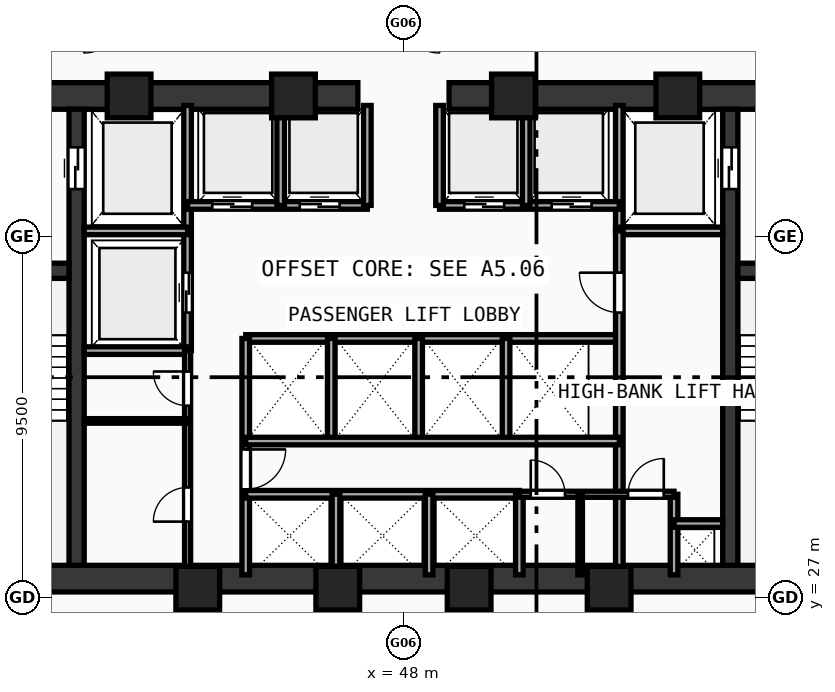
"""IFC4 building model, lengths in metres.
Left out: names, types, materials, properties, quantities, classifications, styles, units other than length and angle.
Written with IfcOpenShell. Run it as: python <this file> out.ifc"""

import sys

from ifc_helpers import new_model, si_unit, direction, frame, frame_2d, origin, origin_with_axes, origin_2d, place, context, subcontext, project, spatial, rectangle, hollow_rectangle, extrude, source, transform, mapped, element, fill, save


model = new_model("IFC4")
c1 = context("Model", 3, precision=1e-05, world=origin(), true_north=direction((0.0, 1.0)))
c2 = subcontext(c1, "Body", "Model", "MODEL_VIEW")
j1 = project(units=[si_unit("LENGTHUNIT", "METRE"), si_unit("PLANEANGLEUNIT", "RADIAN")], contexts=[c1])
p1 = place(None, origin())
s1 = spatial("IfcSite", under=j1, at=p1, CompositionType="ELEMENT")
p2 = place(p1, origin())
s2 = spatial("IfcBuilding", under=s1, at=p2, CompositionType="ELEMENT")
p3 = place(p2, frame((0.0, 0.0, 70.33)))
s3 = spatial("IfcBuildingStorey", under=s2, at=p3, CompositionType="ELEMENT", Elevation=70.33)
p4 = place(p3, frame((35.45, 27.5, 0.0), z_axis=(0.0, 0.0, 1.0), x_axis=(1.0, 0.0, 0.0)))
e1 = element("IfcWall", 1, at=p4, inside=s3, PredefinedType="SHEAR", context=c2, shape_type="SweptSolid", body=[
    extrude(rectangle(XDim=25.1, YDim=0.7, at=frame_2d((12.55, 0.0))), origin(), (0.0, 0.0, 1.0), 5.77),
])
p5 = place(p3, frame((35.45, 40.2, 0.0), z_axis=(0.0, 0.0, 1.0), x_axis=(1.0, 0.0, 0.0)))
e2 = element("IfcWall", 2, at=p5, inside=s3, PredefinedType="SHEAR", context=c2, shape_type="SweptSolid", body=[
    extrude(rectangle(XDim=11.35, YDim=0.7, at=frame_2d((5.675, 0.0))), origin(), (0.0, 0.0, 1.0), 5.77),
])
p6 = place(p5, frame((1.7, 0.0, 0.0)))
e3 = element("IfcOpeningElement", 3, at=p6, cuts=e2, PredefinedType="OPENING", context=c2, shape_type="SweptSolid", body=[
    extrude(rectangle(XDim=1.05, YDim=2.1, at=frame_2d((0.525, 1.05))), frame((0.0, 0.36, 0.0), z_axis=(0.0, -1.0, 0.0), x_axis=(1.0, 0.0, 0.0)), (0.0, 0.0, 1.0), 0.72),
])
p7 = place(p3, frame((49.2, 40.2, 0.0), z_axis=(0.0, 0.0, 1.0), x_axis=(1.0, 0.0, 0.0)))
e4 = element("IfcWall", 4, at=p7, inside=s3, PredefinedType="SHEAR", context=c2, shape_type="SweptSolid", body=[
    extrude(rectangle(XDim=11.35, YDim=0.7, at=frame_2d((5.675, 0.0))), origin(), (0.0, 0.0, 1.0), 5.77),
])
p8 = place(p7, frame((8.6, 0.0, 0.0)))
e5 = element("IfcOpeningElement", 5, at=p8, cuts=e4, PredefinedType="OPENING", context=c2, shape_type="SweptSolid", body=[
    extrude(rectangle(XDim=1.05, YDim=2.1, at=frame_2d((0.525, 1.05))), frame((0.0, 0.36, 0.0), z_axis=(0.0, -1.0, 0.0), x_axis=(1.0, 0.0, 0.0)), (0.0, 0.0, 1.0), 0.72),
])
p9 = place(p3, frame((39.4, 27.85, 0.0), z_axis=(0.0, 0.0, 1.0), x_axis=(0.0, 1.0, 0.0)))
e6 = element("IfcWall", 6, at=p9, inside=s3, PredefinedType="SHEAR", context=c2, shape_type="SweptSolid", body=[
    extrude(rectangle(XDim=12.0, YDim=0.4, at=frame_2d((6.0, 0.0))), origin(), (0.0, 0.0, 1.0), 5.77),
])
p10 = place(p9, frame((9.9, 0.0, 0.0)))
e7 = element("IfcOpeningElement", 7, at=p10, cuts=e6, PredefinedType="OPENING", context=c2, shape_type="SweptSolid", body=[
    extrude(rectangle(XDim=1.1, YDim=2.1, at=frame_2d((0.55, 1.05))), frame((0.0, 0.21, 0.0), z_axis=(0.0, -1.0, 0.0), x_axis=(1.0, 0.0, 0.0)), (0.0, 0.0, 1.0), 0.42),
])
p11 = place(p3, frame((56.6, 27.85, 0.0), z_axis=(0.0, 0.0, 1.0), x_axis=(0.0, 1.0, 0.0)))
e8 = element("IfcWall", 8, at=p11, inside=s3, PredefinedType="SHEAR", context=c2, shape_type="SweptSolid", body=[
    extrude(rectangle(XDim=12.0, YDim=0.4, at=frame_2d((6.0, 0.0))), origin(), (0.0, 0.0, 1.0), 5.77),
])
p12 = place(p11, frame((9.9, 0.0, 0.0)))
e9 = element("IfcOpeningElement", 9, at=p12, cuts=e8, PredefinedType="OPENING", context=c2, shape_type="SweptSolid", body=[
    extrude(rectangle(XDim=1.1, YDim=2.1, at=frame_2d((0.55, 1.05))), frame((0.0, 0.21, 0.0), z_axis=(0.0, -1.0, 0.0), x_axis=(1.0, 0.0, 0.0)), (0.0, 0.0, 1.0), 0.42),
])
p13 = place(p3, frame((36.15, 35.6, 0.0), z_axis=(0.0, 0.0, 1.0), x_axis=(1.0, 0.0, 0.0)))
e10 = element("IfcWall", 10, at=p13, inside=s3, PredefinedType="SHEAR", context=c2, shape_type="SweptSolid", body=[
    extrude(rectangle(XDim=3.05, YDim=0.4, at=frame_2d((1.525, 0.0))), origin(), (0.0, 0.0, 1.0), 5.77),
])
p14 = place(p13, frame((0.97, 0.0, 0.0)))
e11 = element("IfcOpeningElement", 11, at=p14, cuts=e10, PredefinedType="OPENING", context=c2, shape_type="SweptSolid", body=[
    extrude(rectangle(XDim=1.05, YDim=2.1, at=frame_2d((0.525, 1.05))), frame((0.0, 0.21, 0.0), z_axis=(0.0, -1.0, 0.0), x_axis=(1.0, 0.0, 0.0)), (0.0, 0.0, 1.0), 0.42),
])
p15 = place(p3, frame((56.8, 35.6, 0.0), z_axis=(0.0, 0.0, 1.0), x_axis=(1.0, 0.0, 0.0)))
e12 = element("IfcWall", 12, at=p15, inside=s3, PredefinedType="SHEAR", context=c2, shape_type="SweptSolid", body=[
    extrude(rectangle(XDim=3.05, YDim=0.4, at=frame_2d((1.525, 0.0))), origin(), (0.0, 0.0, 1.0), 5.77),
])
p16 = place(p15, frame((1.02, 0.0, 0.0)))
e13 = element("IfcOpeningElement", 13, at=p16, cuts=e12, PredefinedType="OPENING", context=c2, shape_type="SweptSolid", body=[
    extrude(rectangle(XDim=1.05, YDim=2.1, at=frame_2d((0.525, 1.05))), frame((0.0, 0.21, 0.0), z_axis=(0.0, -1.0, 0.0), x_axis=(1.0, 0.0, 0.0)), (0.0, 0.0, 1.0), 0.42),
])
m1 = source(origin(), c2, "Body", "SweptSolid", [
    extrude(hollow_rectangle(XDim=1.15, YDim=1.15, WallThickness=0.048, at=origin_2d()), origin(), (0.0, 0.0, 1.0), 6.03),
])
for number, where, z_axis, x_axis in (
    (14, (42.588, 27.25, -0.26), (0.0, 0.0, 1.0), (1.0, 0.0, 0.0)),
    (15, (46.272, 27.25, -0.26), (0.0, 0.0, 1.0), (1.0, 0.0, 0.0)),
    (16, (49.729, 27.25, -0.26), (0.0, 0.0, 1.0), (1.0, 0.0, 0.0)),
    (17, (53.412, 27.25, -0.26), (0.0, 0.0, 1.0), (1.0, 0.0, 0.0)),
    (18, (55.219, 40.2, -0.26), (0.0, 0.0, 1.0), (1.0, 0.0, 0.0)),
    (19, (50.894, 40.2, -0.26), (0.0, 0.0, 1.0), (1.0, 0.0, 0.0)),
    (20, (45.106, 40.2, -0.26), (0.0, 0.0, 1.0), (1.0, 0.0, 0.0)),
    (21, (40.781, 40.2, -0.26), (0.0, 0.0, 1.0), (1.0, 0.0, 0.0)),
):
    element("IfcColumn", number, at=place(p3, frame(where, z_axis=z_axis, x_axis=x_axis)), inside=s3, PredefinedType="COLUMN", context=c2, shape_type="MappedRepresentation", body=[
        mapped(m1, transform((0.0, 0.0, 0.0), scale=1.0)),
    ])
p17 = place(p3, frame((42.32, 33.5, 0.0), z_axis=(0.0, 0.0, 1.0), x_axis=(0.0, 1.0, 0.0)))
e22 = element("IfcWall", 22, at=p17, inside=s3, PredefinedType="SOLIDWALL", context=c2, shape_type="SweptSolid", body=[
    extrude(rectangle(XDim=6.45, YDim=0.2, at=frame_2d((3.225, 0.0))), origin(), (0.0, 0.0, 1.0), 5.77),
])
p18 = place(p17, frame((1.0, 0.0, 0.0)))
e23 = element("IfcOpeningElement", 23, at=p18, cuts=e22, PredefinedType="OPENING", context=c2, shape_type="SweptSolid", body=[
    extrude(rectangle(XDim=1.05, YDim=2.1, at=frame_2d((0.525, 1.05))), frame((0.0, 0.11, 0.0), z_axis=(0.0, -1.0, 0.0), x_axis=(1.0, 0.0, 0.0)), (0.0, 0.0, 1.0), 0.22),
])
for number, where, z_axis, x_axis in (
    (24, (39.6, 36.65, 0.0), (0.0, 0.0, 1.0), (1.0, 0.0, 0.0)),
    (25, (39.6, 33.5, 0.0), (0.0, 0.0, 1.0), (1.0, 0.0, 0.0)),
):
    element("IfcWall", number, at=place(p3, frame(where, z_axis=z_axis, x_axis=x_axis)), inside=s3, PredefinedType="SOLIDWALL", context=c2, shape_type="SweptSolid", body=[
        extrude(rectangle(XDim=2.72, YDim=0.2, at=frame_2d((1.36, 0.0))), origin(), (0.0, 0.0, 1.0), 5.77),
    ])
p19 = place(p3, frame((53.68, 36.65, 0.0), z_axis=(0.0, 0.0, 1.0), x_axis=(0.0, 1.0, 0.0)))
e26 = element("IfcWall", 26, at=p19, inside=s3, PredefinedType="SOLIDWALL", context=c2, shape_type="SweptSolid", body=[
    extrude(rectangle(XDim=3.3, YDim=0.2, at=frame_2d((1.65, 0.0))), origin(), (0.0, 0.0, 1.0), 5.77),
])
p20 = place(p3, frame((53.68, 36.65, 0.0), z_axis=(0.0, 0.0, 1.0), x_axis=(1.0, 0.0, 0.0)))
e27 = element("IfcWall", 27, at=p20, inside=s3, PredefinedType="SOLIDWALL", context=c2, shape_type="SweptSolid", body=[
    extrude(rectangle(XDim=2.72, YDim=0.2, at=frame_2d((1.36, 0.0))), origin(), (0.0, 0.0, 1.0), 5.77),
])
p21 = place(p3, frame((42.32, 37.32, 0.0), z_axis=(0.0, 0.0, 1.0), x_axis=(1.0, 0.0, 0.0)))
e28 = element("IfcWall", 28, at=p21, inside=s3, PredefinedType="SOLIDWALL", context=c2, shape_type="SweptSolid", body=[
    extrude(rectangle(XDim=4.73, YDim=0.2, at=frame_2d((2.365, 0.0))), origin(), (0.0, 0.0, 1.0), 5.77),
])
p22 = place(p21, frame((0.65, 0.0, 0.0)))
e29 = element("IfcOpeningElement", 29, at=p22, cuts=e28, PredefinedType="OPENING", context=c2, shape_type="SweptSolid", body=[
    extrude(rectangle(XDim=1.05, YDim=2.1, at=frame_2d((0.525, 1.05))), frame((0.0, 0.11, 0.0), z_axis=(0.0, -1.0, 0.0), x_axis=(1.0, 0.0, 0.0)), (0.0, 0.0, 1.0), 0.22),
])
p23 = place(p21, frame((2.95, 0.0, 0.0)))
e30 = element("IfcOpeningElement", 30, at=p23, cuts=e28, PredefinedType="OPENING", context=c2, shape_type="SweptSolid", body=[
    extrude(rectangle(XDim=1.05, YDim=2.1, at=frame_2d((0.525, 1.05))), frame((0.0, 0.11, 0.0), z_axis=(0.0, -1.0, 0.0), x_axis=(1.0, 0.0, 0.0)), (0.0, 0.0, 1.0), 0.22),
])
p24 = place(p3, frame((48.95, 37.32, 0.0), z_axis=(0.0, 0.0, 1.0), x_axis=(1.0, 0.0, 0.0)))
e31 = element("IfcWall", 31, at=p24, inside=s3, PredefinedType="SOLIDWALL", context=c2, shape_type="SweptSolid", body=[
    extrude(rectangle(XDim=4.73, YDim=0.2, at=frame_2d((2.365, 0.0))), origin(), (0.0, 0.0, 1.0), 5.77),
])
p25 = place(p24, frame((0.65, 0.0, 0.0)))
e32 = element("IfcOpeningElement", 32, at=p25, cuts=e31, PredefinedType="OPENING", context=c2, shape_type="SweptSolid", body=[
    extrude(rectangle(XDim=1.05, YDim=2.1, at=frame_2d((0.525, 1.05))), frame((0.0, 0.11, 0.0), z_axis=(0.0, -1.0, 0.0), x_axis=(1.0, 0.0, 0.0)), (0.0, 0.0, 1.0), 0.22),
])
p26 = place(p24, frame((2.95, 0.0, 0.0)))
e33 = element("IfcOpeningElement", 33, at=p26, cuts=e31, PredefinedType="OPENING", context=c2, shape_type="SweptSolid", body=[
    extrude(rectangle(XDim=1.05, YDim=2.1, at=frame_2d((0.525, 1.05))), frame((0.0, 0.11, 0.0), z_axis=(0.0, -1.0, 0.0), x_axis=(1.0, 0.0, 0.0)), (0.0, 0.0, 1.0), 0.22),
])
for number, where, z_axis, x_axis in (
    (34, (47.05, 37.32, 0.0), (0.0, 0.0, 1.0), (0.0, 1.0, 0.0)),
    (35, (48.95, 37.32, 0.0), (0.0, 0.0, 1.0), (0.0, 1.0, 0.0)),
):
    element("IfcWall", number, at=place(p3, frame(where, z_axis=z_axis, x_axis=x_axis)), inside=s3, PredefinedType="SOLIDWALL", context=c2, shape_type="SweptSolid", body=[
        extrude(rectangle(XDim=2.63, YDim=0.2, at=frame_2d((1.315, 0.0))), origin(), (0.0, 0.0, 1.0), 5.77),
    ])
for number, where, z_axis, x_axis in (
    (36, (44.77, 37.32, 0.0), (0.0, 0.0, 1.0), (0.0, 1.0, 0.0)),
    (37, (51.23, 37.32, 0.0), (0.0, 0.0, 1.0), (0.0, 1.0, 0.0)),
):
    element("IfcWall", number, at=place(p3, frame(where, z_axis=z_axis, x_axis=x_axis)), inside=s3, PredefinedType="SOLIDWALL", context=c2, shape_type="SweptSolid", body=[
        extrude(rectangle(XDim=2.63, YDim=0.2, at=frame_2d((1.315, 0.0))), origin(), (0.0, 0.0, 1.0), 2.42),
    ])
p27 = place(p3, frame((43.85, 33.82, 0.0), z_axis=(0.0, 0.0, 1.0), x_axis=(1.0, 0.0, 0.0)))
e38 = element("IfcWall", 38, at=p27, inside=s3, PredefinedType="SOLIDWALL", context=c2, shape_type="SweptSolid", body=[
    extrude(rectangle(XDim=9.83, YDim=0.2, at=frame_2d((4.915, 0.0))), origin(), (0.0, 0.0, 1.0), 5.77),
])
p28 = place(p3, frame((43.85, 27.6, 0.0), z_axis=(0.0, 0.0, 1.0), x_axis=(0.0, 1.0, 0.0)))
e39 = element("IfcWall", 39, at=p28, inside=s3, PredefinedType="SOLIDWALL", context=c2, shape_type="SweptSolid", body=[
    extrude(rectangle(XDim=6.22, YDim=0.2, at=frame_2d((3.11, 0.0))), origin(), (0.0, 0.0, 1.0), 5.77),
])
p29 = place(p28, frame((2.25, 0.0, 0.0)))
e40 = element("IfcOpeningElement", 40, at=p29, cuts=e39, PredefinedType="OPENING", context=c2, shape_type="SweptSolid", body=[
    extrude(rectangle(XDim=1.05, YDim=2.1, at=frame_2d((0.525, 1.05))), frame((0.0, 0.11, 0.0), z_axis=(0.0, -1.0, 0.0), x_axis=(1.0, 0.0, 0.0)), (0.0, 0.0, 1.0), 0.22),
])
p30 = place(p3, frame((53.68, 27.6, 0.0), z_axis=(0.0, 0.0, 1.0), x_axis=(0.0, 1.0, 0.0)))
e41 = element("IfcWall", 41, at=p30, inside=s3, PredefinedType="SOLIDWALL", context=c2, shape_type="SweptSolid", body=[
    extrude(rectangle(XDim=9.05, YDim=0.2, at=frame_2d((4.525, 0.0))), origin(), (0.0, 0.0, 1.0), 2.42),
])
p31 = place(p30, frame((6.9, 0.0, 0.0)))
e42 = element("IfcOpeningElement", 42, at=p31, cuts=e41, PredefinedType="OPENING", context=c2, shape_type="SweptSolid", body=[
    extrude(rectangle(XDim=1.05, YDim=2.1, at=frame_2d((0.525, 1.05))), frame((0.0, 0.11, 0.0), z_axis=(0.0, -1.0, 0.0), x_axis=(1.0, 0.0, 0.0)), (0.0, 0.0, 1.0), 0.22),
])
for number, where, z_axis, x_axis in (
    (43, (46.1, 31.12, 0.0), (0.0, 0.0, 1.0), (0.0, 1.0, 0.0)),
    (44, (48.4, 31.12, 0.0), (0.0, 0.0, 1.0), (0.0, 1.0, 0.0)),
    (45, (50.7, 31.12, 0.0), (0.0, 0.0, 1.0), (0.0, 1.0, 0.0)),
):
    element("IfcWall", number, at=place(p3, frame(where, z_axis=z_axis, x_axis=x_axis)), inside=s3, PredefinedType="SOLIDWALL", context=c2, shape_type="SweptSolid", body=[
        extrude(rectangle(XDim=2.7, YDim=0.2, at=frame_2d((1.35, 0.0))), origin(), (0.0, 0.0, 1.0), 5.77),
    ])
p32 = place(p3, frame((43.85, 29.72, 0.0), z_axis=(0.0, 0.0, 1.0), x_axis=(1.0, 0.0, 0.0)))
e46 = element("IfcWall", 46, at=p32, inside=s3, PredefinedType="SOLIDWALL", context=c2, shape_type="SweptSolid", body=[
    extrude(rectangle(XDim=7.2, YDim=0.2, at=frame_2d((3.6, 0.0))), origin(), (0.0, 0.0, 1.0), 5.77),
])
p33 = place(p3, frame((51.05, 27.6, 0.0), z_axis=(0.0, 0.0, 1.0), x_axis=(0.0, 1.0, 0.0)))
e47 = element("IfcWall", 47, at=p33, inside=s3, PredefinedType="SOLIDWALL", context=c2, shape_type="SweptSolid", body=[
    extrude(rectangle(XDim=2.12, YDim=0.2, at=frame_2d((1.06, 0.0))), origin(), (0.0, 0.0, 1.0), 5.77),
])
p34 = place(p3, frame((43.85, 31.12, 0.0), z_axis=(0.0, 0.0, 1.0), x_axis=(1.0, 0.0, 0.0)))
e48 = element("IfcWall", 48, at=p34, inside=s3, PredefinedType="SOLIDWALL", context=c2, shape_type="SweptSolid", body=[
    extrude(rectangle(XDim=9.83, YDim=0.2, at=frame_2d((4.915, 0.0))), origin(), (0.0, 0.0, 1.0), 5.77),
])
p35 = place(p3, frame((46.225, 27.6, 0.0), z_axis=(0.0, 0.0, 1.0), x_axis=(0.0, 1.0, 0.0)))
e49 = element("IfcWall", 49, at=p35, inside=s3, PredefinedType="SOLIDWALL", context=c2, shape_type="SweptSolid", body=[
    extrude(rectangle(XDim=2.12, YDim=0.2, at=frame_2d((1.06, 0.0))), origin(), (0.0, 0.0, 1.0), 2.42),
])
for number, where, z_axis, x_axis in (
    (50, (48.675, 27.6, 0.0), (0.0, 0.0, 1.0), (0.0, 1.0, 0.0)),
    (51, (55.12, 27.6, 0.0), (0.0, 0.0, 1.0), (0.0, 1.0, 0.0)),
):
    element("IfcWall", number, at=place(p3, frame(where, z_axis=z_axis, x_axis=x_axis)), inside=s3, PredefinedType="SOLIDWALL", context=c2, shape_type="SweptSolid", body=[
        extrude(rectangle(XDim=2.12, YDim=0.2, at=frame_2d((1.06, 0.0))), origin(), (0.0, 0.0, 1.0), 5.77),
    ])
p36 = place(p3, frame((55.12, 28.95, 0.0), z_axis=(0.0, 0.0, 1.0), x_axis=(1.0, 0.0, 0.0)))
e52 = element("IfcWall", 52, at=p36, inside=s3, PredefinedType="SOLIDWALL", context=c2, shape_type="SweptSolid", body=[
    extrude(rectangle(XDim=1.28, YDim=0.2, at=frame_2d((0.64, 0.0))), origin(), (0.0, 0.0, 1.0), 5.77),
])
p37 = place(p3, frame((42.32, 27.6, 0.0), z_axis=(0.0, 0.0, 1.0), x_axis=(0.0, 1.0, 0.0)))
e53 = element("IfcWall", 53, at=p37, inside=s3, PredefinedType="PARTITIONING", context=c2, shape_type="SweptSolid", body=[
    extrude(rectangle(XDim=5.9, YDim=0.16, at=frame_2d((2.95, 0.0))), origin(), (0.0, 0.0, 1.0), 2.42),
])
p38 = place(p37, frame((1.4, 0.0, 0.0)))
e54 = element("IfcOpeningElement", 54, at=p38, cuts=e53, PredefinedType="OPENING", context=c2, shape_type="SweptSolid", body=[
    extrude(rectangle(XDim=0.9, YDim=2.1, at=frame_2d((0.45, 1.05))), frame((0.0, 0.09, 0.0), z_axis=(0.0, -1.0, 0.0), x_axis=(1.0, 0.0, 0.0)), (0.0, 0.0, 1.0), 0.18),
])
p39 = place(p37, frame((4.45, 0.0, 0.0)))
e55 = element("IfcOpeningElement", 55, at=p39, cuts=e53, PredefinedType="OPENING", context=c2, shape_type="SweptSolid", body=[
    extrude(rectangle(XDim=0.9, YDim=2.1, at=frame_2d((0.45, 1.05))), frame((0.0, 0.09, 0.0), z_axis=(0.0, -1.0, 0.0), x_axis=(1.0, 0.0, 0.0)), (0.0, 0.0, 1.0), 0.18),
])
p40 = place(p3, frame((51.05, 29.72, 0.0), z_axis=(0.0, 0.0, 1.0), x_axis=(1.0, 0.0, 0.0)))
e56 = element("IfcWall", 56, at=p40, inside=s3, PredefinedType="PARTITIONING", context=c2, shape_type="SweptSolid", body=[
    extrude(rectangle(XDim=4.07, YDim=0.16, at=frame_2d((2.035, 0.0))), origin(), (0.0, 0.0, 1.0), 5.77),
])
p41 = place(p40, frame((0.3, 0.0, 0.0)))
e57 = element("IfcOpeningElement", 57, at=p41, cuts=e56, PredefinedType="OPENING", context=c2, shape_type="SweptSolid", body=[
    extrude(rectangle(XDim=0.9, YDim=2.1, at=frame_2d((0.45, 1.05))), frame((0.0, 0.09, 0.0), z_axis=(0.0, -1.0, 0.0), x_axis=(1.0, 0.0, 0.0)), (0.0, 0.0, 1.0), 0.18),
])
p42 = place(p40, frame((2.86, 0.0, 0.0)))
e58 = element("IfcOpeningElement", 58, at=p42, cuts=e56, PredefinedType="OPENING", context=c2, shape_type="SweptSolid", body=[
    extrude(rectangle(XDim=0.94, YDim=2.1, at=frame_2d((0.47, 1.05))), frame((0.0, 0.09, 0.0), z_axis=(0.0, -1.0, 0.0), x_axis=(1.0, 0.0, 0.0)), (0.0, 0.0, 1.0), 0.18),
])
p43 = place(p3, frame((39.6, 31.65, 0.0), z_axis=(0.0, 0.0, 1.0), x_axis=(1.0, 0.0, 0.0)))
e59 = element("IfcWall", 59, at=p43, inside=s3, PredefinedType="PARTITIONING", context=c2, shape_type="SweptSolid", body=[
    extrude(rectangle(XDim=2.72, YDim=0.12, at=frame_2d((1.36, 0.0))), origin(), (0.0, 0.0, 1.0), 5.77),
])
p44 = place(p3, frame((52.65, 27.6, 0.0), z_axis=(0.0, 0.0, 1.0), x_axis=(0.0, 1.0, 0.0)))
e60 = element("IfcWall", 60, at=p44, inside=s3, PredefinedType="PARTITIONING", context=c2, shape_type="SweptSolid", body=[
    extrude(rectangle(XDim=2.12, YDim=0.12, at=frame_2d((1.06, 0.0))), origin(), (0.0, 0.0, 1.0), 5.77),
])
m2 = source(origin(), c2, "Body", "SweptSolid", [
    extrude(rectangle(XDim=1.1, YDim=2.1, at=frame_2d((0.55, 1.05))), frame((0.0, 0.025, 0.0), z_axis=(0.0, -1.0, 0.0), x_axis=(1.0, 0.0, 0.0)), (0.0, 0.0, 1.0), 0.05),
])
p45 = place(p10, frame((1.1, 0.0, 0.0), z_axis=(0.0, 0.0, 1.0), x_axis=(-1.0, 0.0, 0.0)))
e61 = element("IfcDoor", 61, at=p45, inside=s3, OperationType="DOUBLE_DOOR_SLIDING", PredefinedType="DOOR", context=c2, shape_type="MappedRepresentation", body=[
    mapped(m2, transform((0.0, 0.0, 0.0), scale=1.0)),
])
fill(e7, e61)
p46 = place(p12, origin_with_axes())
e62 = element("IfcDoor", 62, at=p46, inside=s3, OperationType="DOUBLE_DOOR_SLIDING", PredefinedType="DOOR", context=c2, shape_type="MappedRepresentation", body=[
    mapped(m2, transform((0.0, 0.0, 0.0), scale=1.0)),
])
fill(e9, e62)
m3 = source(origin(), c2, "Body", "SweptSolid", [
    extrude(rectangle(XDim=1.05, YDim=2.1, at=frame_2d((0.525, 1.05))), frame((0.0, 0.025, 0.0), z_axis=(0.0, -1.0, 0.0), x_axis=(1.0, 0.0, 0.0)), (0.0, 0.0, 1.0), 0.05),
])
p47 = place(p18, origin_with_axes())
e63 = element("IfcDoor", 63, at=p47, inside=s3, OperationType="DOUBLE_DOOR_SLIDING", PredefinedType="DOOR", context=c2, shape_type="MappedRepresentation", body=[
    mapped(m3, transform((0.0, 0.0, 0.0), scale=1.0)),
])
fill(e23, e63)
p48 = place(p22, frame((1.05, 0.0, 0.0), z_axis=(0.0, 0.0, 1.0), x_axis=(-1.0, 0.0, 0.0)))
e64 = element("IfcDoor", 64, at=p48, inside=s3, OperationType="DOUBLE_DOOR_SLIDING", PredefinedType="DOOR", context=c2, shape_type="MappedRepresentation", body=[
    mapped(m3, transform((0.0, 0.0, 0.0), scale=1.0)),
])
fill(e29, e64)
p49 = place(p23, frame((1.05, 0.0, 0.0), z_axis=(0.0, 0.0, 1.0), x_axis=(-1.0, 0.0, 0.0)))
e65 = element("IfcDoor", 65, at=p49, inside=s3, OperationType="DOUBLE_DOOR_SLIDING", PredefinedType="DOOR", context=c2, shape_type="MappedRepresentation", body=[
    mapped(m3, transform((0.0, 0.0, 0.0), scale=1.0)),
])
fill(e30, e65)
p50 = place(p25, frame((1.05, 0.0, 0.0), z_axis=(0.0, 0.0, 1.0), x_axis=(-1.0, 0.0, 0.0)))
e66 = element("IfcDoor", 66, at=p50, inside=s3, OperationType="DOUBLE_DOOR_SLIDING", PredefinedType="DOOR", context=c2, shape_type="MappedRepresentation", body=[
    mapped(m3, transform((0.0, 0.0, 0.0), scale=1.0)),
])
fill(e32, e66)
p51 = place(p26, frame((1.05, 0.0, 0.0), z_axis=(0.0, 0.0, 1.0), x_axis=(-1.0, 0.0, 0.0)))
e67 = element("IfcDoor", 67, at=p51, inside=s3, OperationType="DOUBLE_DOOR_SLIDING", PredefinedType="DOOR", context=c2, shape_type="MappedRepresentation", body=[
    mapped(m3, transform((0.0, 0.0, 0.0), scale=1.0)),
])
fill(e33, e67)
p52 = place(p29, frame((1.05, 0.0, 0.0), z_axis=(0.0, 0.0, 1.0), x_axis=(-1.0, 0.0, 0.0)))
e68 = element("IfcDoor", 68, at=p52, inside=s3, OperationType="SINGLE_SWING_LEFT", PredefinedType="DOOR", context=c2, shape_type="MappedRepresentation", body=[
    mapped(m3, transform((0.0, 0.0, 0.0), scale=1.0)),
])
fill(e40, e68)
p53 = place(p31, origin_with_axes())
e69 = element("IfcDoor", 69, at=p53, inside=s3, OperationType="SINGLE_SWING_RIGHT", PredefinedType="DOOR", context=c2, shape_type="MappedRepresentation", body=[
    mapped(m3, transform((0.0, 0.0, 0.0), scale=1.0)),
])
fill(e42, e69)
m4 = source(origin(), c2, "Body", "SweptSolid", [
    extrude(rectangle(XDim=0.9, YDim=2.1, at=frame_2d((0.45, 1.05))), frame((0.0, 0.025, 0.0), z_axis=(0.0, -1.0, 0.0), x_axis=(1.0, 0.0, 0.0)), (0.0, 0.0, 1.0), 0.05),
])
p54 = place(p38, origin_with_axes())
e70 = element("IfcDoor", 70, at=p54, inside=s3, OperationType="SINGLE_SWING_LEFT", PredefinedType="DOOR", context=c2, shape_type="MappedRepresentation", body=[
    mapped(m4, transform((0.0, 0.0, 0.0), scale=1.0)),
])
fill(e54, e70)
p55 = place(p39, origin_with_axes())
e71 = element("IfcDoor", 71, at=p55, inside=s3, OperationType="SINGLE_SWING_RIGHT", PredefinedType="DOOR", context=c2, shape_type="MappedRepresentation", body=[
    mapped(m4, transform((0.0, 0.0, 0.0), scale=1.0)),
])
fill(e55, e71)
p56 = place(p41, origin_with_axes())
e72 = element("IfcDoor", 72, at=p56, inside=s3, OperationType="SINGLE_SWING_LEFT", PredefinedType="DOOR", context=c2, shape_type="MappedRepresentation", body=[
    mapped(m4, transform((0.0, 0.0, 0.0), scale=1.0)),
])
fill(e57, e72)
m5 = source(origin(), c2, "Body", "SweptSolid", [
    extrude(rectangle(XDim=0.94, YDim=2.1, at=frame_2d((0.47, 1.05))), frame((0.0, 0.025, 0.0), z_axis=(0.0, -1.0, 0.0), x_axis=(1.0, 0.0, 0.0)), (0.0, 0.0, 1.0), 0.05),
])
p57 = place(p42, origin_with_axes())
e73 = element("IfcDoor", 73, at=p57, inside=s3, OperationType="SINGLE_SWING_RIGHT", PredefinedType="DOOR", context=c2, shape_type="MappedRepresentation", body=[
    mapped(m5, transform((0.0, 0.0, 0.0), scale=1.0)),
])
fill(e58, e73)
save(model, sys.argv[1])
